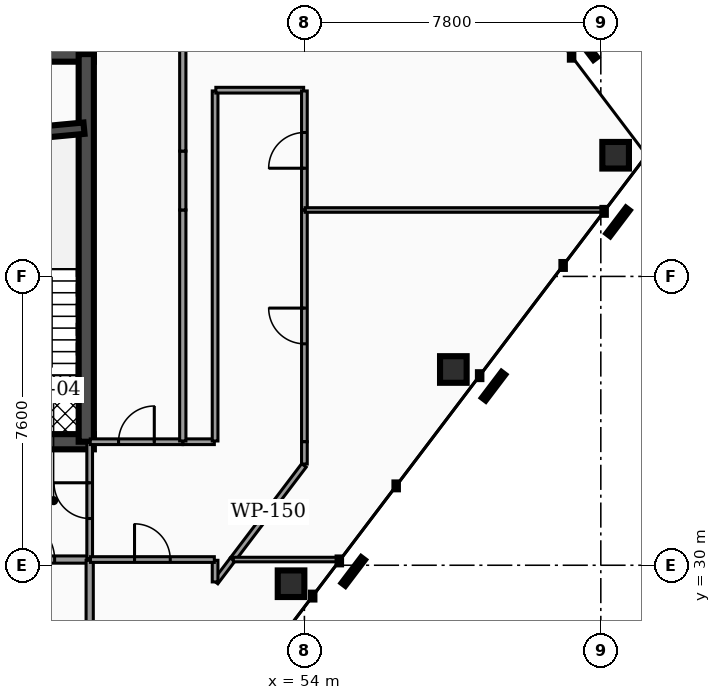
"""IFC4 building model, lengths in metres.
Left out: names, types, materials, properties, quantities, classifications, styles, units other than length and angle.
Written with IfcOpenShell. Run it as: python <this file> out.ifc"""

import sys

from ifc_helpers import new_model, si_unit, direction, frame, frame_2d, origin, origin_2d, place, context, subcontext, project, spatial, rectangle, hollow_rectangle, extrude, element, fill, save


model = new_model("IFC4")
c1 = context("Model", 3, precision=1e-05, world=origin(), true_north=direction((0.0, 1.0)))
c2 = subcontext(c1, "Body", "Model", "MODEL_VIEW")
j1 = project(units=[si_unit("LENGTHUNIT", "METRE"), si_unit("PLANEANGLEUNIT", "RADIAN")], contexts=[c1])
p1 = place(None, origin())
s1 = spatial("IfcSite", under=j1, at=p1, CompositionType="ELEMENT")
p2 = place(p1, origin())
s2 = spatial("IfcBuilding", under=s1, at=p2, CompositionType="ELEMENT")
p3 = place(p2, frame((0.0, 0.0, 187.0)))
s3 = spatial("IfcBuildingStorey", under=s2, at=p3, CompositionType="ELEMENT", Elevation=187.0)
p4 = place(p3, frame((28.4, 43.45, 0.0), z_axis=(0.0, 0.0, 1.0), x_axis=(1.0, 0.0, 0.0)))
e1 = element("IfcWall", 1, at=p4, inside=s3, PredefinedType="SHEAR", context=c2, shape_type="SweptSolid", body=[
    extrude(rectangle(XDim=20.06, YDim=0.4, at=frame_2d((10.03, 0.0))), origin(), (0.0, 0.0, 1.0), 3.5),
])
p5 = place(p3, frame((28.4, 33.25, 0.0), z_axis=(0.0, 0.0, 1.0), x_axis=(1.0, 0.0, 0.0)))
e2 = element("IfcWall", 2, at=p5, inside=s3, PredefinedType="SHEAR", context=c2, shape_type="SweptSolid", body=[
    extrude(rectangle(XDim=20.06, YDim=0.4, at=frame_2d((10.03, 0.0))), origin(), (0.0, 0.0, 1.0), 3.5),
])
p6 = place(p5, frame((4.03, 0.0, 0.0)))
e3 = element("IfcOpeningElement", 3, at=p6, cuts=e2, PredefinedType="OPENING", context=c2, shape_type="SweptSolid", body=[
    extrude(rectangle(XDim=1.1, YDim=2.15, at=frame_2d((0.55, 1.075))), frame((0.0, 0.21, 0.0), z_axis=(0.0, -1.0, 0.0), x_axis=(1.0, 0.0, 0.0)), (0.0, 0.0, 1.0), 0.42),
])
p7 = place(p5, frame((14.87, 0.0, 0.0)))
e4 = element("IfcOpeningElement", 4, at=p7, cuts=e2, PredefinedType="OPENING", context=c2, shape_type="SweptSolid", body=[
    extrude(rectangle(XDim=1.1, YDim=2.15, at=frame_2d((0.55, 1.075))), frame((0.0, 0.21, 0.0), z_axis=(0.0, -1.0, 0.0), x_axis=(1.0, 0.0, 0.0)), (0.0, 0.0, 1.0), 0.42),
])
p8 = place(p5, frame((5.95, 0.0, 0.0)))
e5 = element("IfcOpeningElement", 5, at=p8, cuts=e2, PredefinedType="OPENING", context=c2, shape_type="SweptSolid", body=[
    extrude(rectangle(XDim=1.0, YDim=2.1, at=frame_2d((0.5, 1.05))), frame((0.0, 0.21, 0.0), z_axis=(0.0, -1.0, 0.0), x_axis=(1.0, 0.0, 0.0)), (0.0, 0.0, 1.0), 0.42),
])
p9 = place(p5, frame((7.65, 0.0, 0.0)))
e6 = element("IfcOpeningElement", 6, at=p9, cuts=e2, PredefinedType="OPENING", context=c2, shape_type="SweptSolid", body=[
    extrude(rectangle(XDim=1.0, YDim=2.1, at=frame_2d((0.5, 1.05))), frame((0.0, 0.21, 0.0), z_axis=(0.0, -1.0, 0.0), x_axis=(1.0, 0.0, 0.0)), (0.0, 0.0, 1.0), 0.42),
])
p10 = place(p5, frame((1.31, 0.0, 0.0)))
e7 = element("IfcOpeningElement", 7, at=p10, cuts=e2, PredefinedType="OPENING", context=c2, shape_type="SweptSolid", body=[
    extrude(rectangle(XDim=1.1, YDim=2.2, at=frame_2d((0.55, 1.1))), frame((0.0, 0.21, 0.0), z_axis=(0.0, -1.0, 0.0), x_axis=(1.0, 0.0, 0.0)), (0.0, 0.0, 1.0), 0.42),
])
p11 = place(p5, frame((9.44, 0.0, 0.0)))
e8 = element("IfcOpeningElement", 8, at=p11, cuts=e2, PredefinedType="OPENING", context=c2, shape_type="SweptSolid", body=[
    extrude(rectangle(XDim=1.12, YDim=2.05, at=frame_2d((0.56, 1.025))), frame((0.0, 0.21, 0.0), z_axis=(0.0, -1.0, 0.0), x_axis=(1.0, 0.0, 0.0)), (0.0, 0.0, 1.0), 0.42),
])
p12 = place(p5, frame((17.65, 0.0, 0.0)))
e9 = element("IfcOpeningElement", 9, at=p12, cuts=e2, PredefinedType="OPENING", context=c2, shape_type="SweptSolid", body=[
    extrude(rectangle(XDim=1.1, YDim=2.2, at=frame_2d((0.55, 1.1))), frame((0.0, 0.21, 0.0), z_axis=(0.0, -1.0, 0.0), x_axis=(1.0, 0.0, 0.0)), (0.0, 0.0, 1.0), 0.42),
])
p13 = place(p3, frame((48.26, 33.25, 0.0), z_axis=(0.0, 0.0, 1.0), x_axis=(0.0, 1.0, 0.0)))
e10 = element("IfcWall", 10, at=p13, inside=s3, PredefinedType="SHEAR", context=c2, shape_type="SweptSolid", body=[
    extrude(rectangle(XDim=10.2, YDim=0.4, at=frame_2d((5.1, 0.0))), origin(), (0.0, 0.0, 1.0), 3.5),
])
p14 = place(p3, frame((44.98, 41.2, 0.0), z_axis=(0.0, 0.0, 1.0), x_axis=(0.995686468965, 0.09278176286, 0.0)))
e11 = element("IfcWall", 11, at=p14, inside=s3, PredefinedType="SHEAR", context=c2, shape_type="SweptSolid", body=[
    extrude(rectangle(XDim=3.234, YDim=0.3, at=frame_2d((1.617, 0.0))), origin(), (0.0, 0.0, 1.0), 3.5),
])
for number, where, z_axis, x_axis in (
    (12, (53.649, 29.514, 0.0), (0.0, 0.0, 1.0), (1.0, 0.0, 0.0)),
    (13, (57.919, 35.151, 0.0), (0.0, 0.0, 1.0), (1.0, 0.0, 0.0)),
    (14, (62.19, 40.788, 0.0), (0.0, 0.0, 1.0), (1.0, 0.0, 0.0)),
):
    element("IfcColumn", number, at=place(p3, frame(where, z_axis=z_axis, x_axis=x_axis)), inside=s3, PredefinedType="COLUMN", context=c2, shape_type="SweptSolid", body=[
        extrude(hollow_rectangle(XDim=0.7, YDim=0.7, WallThickness=0.035, at=origin_2d()), origin(), (0.0, 0.0, 1.0), 3.5),
    ])
p15 = place(p3, frame((45.405, 30.15, 0.0), z_axis=(0.0, 0.0, 1.0), x_axis=(1.0, 0.0, 0.0)))
e15 = element("IfcWall", 15, at=p15, inside=s3, PredefinedType="PARTITIONING", context=c2, shape_type="SweptSolid", body=[
    extrude(rectangle(XDim=2.925, YDim=0.19, at=frame_2d((1.462, 0.0))), origin(), (0.0, 0.0, 1.0), 2.457),
])
p16 = place(p15, frame((0.903, 0.0, 0.0)))
e16 = element("IfcOpeningElement", 16, at=p16, cuts=e15, PredefinedType="OPENING", context=c2, shape_type="SweptSolid", body=[
    extrude(rectangle(XDim=1.12, YDim=2.05, at=frame_2d((0.56, 1.025))), frame((0.0, 0.105, 0.0), z_axis=(0.0, -1.0, 0.0), x_axis=(1.0, 0.0, 0.0)), (0.0, 0.0, 1.0), 0.21),
])
p17 = place(p3, frame((48.35, 30.17, 0.0), z_axis=(0.0, 0.0, 1.0), x_axis=(0.0, 1.0, 0.0)))
e17 = element("IfcWall", 17, at=p17, inside=s3, PredefinedType="PARTITIONING", context=c2, shape_type="SweptSolid", body=[
    extrude(rectangle(XDim=3.06, YDim=0.15, at=frame_2d((1.53, 0.0))), origin(), (0.0, 0.0, 1.0), 2.457),
])
p18 = place(p17, frame((1.06, 0.0, 0.0)))
e18 = element("IfcOpeningElement", 18, at=p18, cuts=e17, PredefinedType="OPENING", context=c2, shape_type="SweptSolid", body=[
    extrude(rectangle(XDim=0.94, YDim=2.05, at=frame_2d((0.47, 1.025))), frame((0.0, 0.085, 0.0), z_axis=(0.0, -1.0, 0.0), x_axis=(1.0, 0.0, 0.0)), (0.0, 0.0, 1.0), 0.17),
])
p19 = place(p3, frame((48.35, 27.37, 0.0), z_axis=(0.0, 0.0, 1.0), x_axis=(0.0, 1.0, 0.0)))
e19 = element("IfcWall", 19, at=p19, inside=s3, PredefinedType="PARTITIONING", context=c2, shape_type="SweptSolid", body=[
    extrude(rectangle(XDim=2.76, YDim=0.19, at=frame_2d((1.38, 0.0))), origin(), (0.0, 0.0, 1.0), 2.457),
])
p20 = place(p3, frame((51.662, 29.557, 0.0), z_axis=(0.0, 0.0, 1.0), x_axis=(0.603572672845, 0.797307988543, 0.0)))
e20 = element("IfcWall", 20, at=p20, inside=s3, PredefinedType="PARTITIONING", context=c2, shape_type="SweptSolid", body=[
    extrude(rectangle(XDim=0.742, YDim=0.15, at=frame_2d((0.371, 0.0))), origin(), (0.0, 0.0, 1.0), 2.457),
])
p21 = place(p3, frame((51.65, 29.562, 0.0), z_axis=(0.0, 0.0, 1.0), x_axis=(0.0, 1.0, 0.0)))
e21 = element("IfcWall", 21, at=p21, inside=s3, PredefinedType="PARTITIONING", context=c2, shape_type="SweptSolid", body=[
    extrude(rectangle(XDim=0.568, YDim=0.15, at=frame_2d((0.284, 0.0))), origin(), (0.0, 0.0, 1.0), 2.457),
])
p22 = place(p3, frame((48.37, 30.15, 0.0), z_axis=(0.0, 0.0, 1.0), x_axis=(1.0, 0.0, 0.0)))
e22 = element("IfcWall", 22, at=p22, inside=s3, PredefinedType="PARTITIONING", context=c2, shape_type="SweptSolid", body=[
    extrude(rectangle(XDim=3.26, YDim=0.15, at=frame_2d((1.63, 0.0))), origin(), (0.0, 0.0, 1.0), 2.457),
])
p23 = place(p22, frame((1.16, 0.0, 0.0)))
e23 = element("IfcOpeningElement", 23, at=p23, cuts=e22, PredefinedType="OPENING", context=c2, shape_type="SweptSolid", body=[
    extrude(rectangle(XDim=0.94, YDim=2.05, at=frame_2d((0.47, 1.025))), frame((0.0, 0.085, 0.0), z_axis=(0.0, -1.0, 0.0), x_axis=(1.0, 0.0, 0.0)), (0.0, 0.0, 1.0), 0.17),
])
p24 = place(p3, frame((54.0, 33.25, 0.0), z_axis=(0.0, 0.0, 1.0), x_axis=(0.0, 1.0, 0.0)))
e24 = element("IfcWall", 24, at=p24, inside=s3, PredefinedType="PARTITIONING", context=c2, shape_type="SweptSolid", body=[
    extrude(rectangle(XDim=6.093, YDim=0.15, at=frame_2d((3.046, 0.0))), origin(), (0.0, 0.0, 1.0), 2.457),
])
p25 = place(p24, frame((2.576, 0.0, 0.0)))
e25 = element("IfcOpeningElement", 25, at=p25, cuts=e24, PredefinedType="OPENING", context=c2, shape_type="SweptSolid", body=[
    extrude(rectangle(XDim=0.94, YDim=2.05, at=frame_2d((0.47, 1.025))), frame((0.0, 0.085, 0.0), z_axis=(0.0, -1.0, 0.0), x_axis=(1.0, 0.0, 0.0)), (0.0, 0.0, 1.0), 0.17),
])
p26 = place(p3, frame((54.0, 32.664, 0.0), z_axis=(0.0, 0.0, 1.0), x_axis=(0.0, 1.0, 0.0)))
e26 = element("IfcWall", 26, at=p26, inside=s3, PredefinedType="PARTITIONING", context=c2, shape_type="SweptSolid", body=[
    extrude(rectangle(XDim=0.586, YDim=0.15, at=frame_2d((0.293, 0.0))), origin(), (0.0, 0.0, 1.0), 2.457),
])
p27 = place(p3, frame((52.114, 30.154, 0.0), z_axis=(0.0, 0.0, 1.0), x_axis=(0.603819819336, 0.797120835116, 0.0)))
e27 = element("IfcWall", 27, at=p27, inside=s3, PredefinedType="PARTITIONING", context=c2, shape_type="SweptSolid", body=[
    extrude(rectangle(XDim=3.103, YDim=0.15, at=frame_2d((1.552, 0.0))), origin(), (0.0, 0.0, 1.0), 2.457),
])
p28 = place(p3, frame((50.805, 33.25, 0.0), z_axis=(0.0, 0.0, 1.0), x_axis=(1.0, 0.0, 0.0)))
e28 = element("IfcWall", 28, at=p28, inside=s3, PredefinedType="PARTITIONING", context=c2, shape_type="SweptSolid", body=[
    extrude(rectangle(XDim=0.825, YDim=0.15, at=frame_2d((0.413, 0.0))), origin(), (0.0, 0.0, 1.0), 2.457),
])
p29 = place(p3, frame((51.65, 33.27, 0.0), z_axis=(0.0, 0.0, 1.0), x_axis=(0.0, 1.0, 0.0)))
e29 = element("IfcWall", 29, at=p29, inside=s3, PredefinedType="PARTITIONING", context=c2, shape_type="SweptSolid", body=[
    extrude(rectangle(XDim=9.21, YDim=0.15, at=frame_2d((4.605, 0.0))), origin(), (0.0, 0.0, 1.0), 2.457),
])
p30 = place(p3, frame((51.67, 42.5, 0.0), z_axis=(0.0, 0.0, 1.0), x_axis=(1.0, 0.0, 0.0)))
e30 = element("IfcWall", 30, at=p30, inside=s3, PredefinedType="PARTITIONING", context=c2, shape_type="SweptSolid", body=[
    extrude(rectangle(XDim=2.31, YDim=0.15, at=frame_2d((1.155, 0.0))), origin(), (0.0, 0.0, 1.0), 2.457),
])
p31 = place(p3, frame((54.0, 39.353, 0.0), z_axis=(0.0, 0.0, 1.0), x_axis=(0.0, 1.0, 0.0)))
e31 = element("IfcWall", 31, at=p31, inside=s3, PredefinedType="PARTITIONING", context=c2, shape_type="SweptSolid", body=[
    extrude(rectangle(XDim=3.127, YDim=0.15, at=frame_2d((1.563, 0.0))), origin(), (0.0, 0.0, 1.0), 2.457),
])
p32 = place(p31, frame((1.094, 0.0, 0.0)))
e32 = element("IfcOpeningElement", 32, at=p32, cuts=e31, PredefinedType="OPENING", context=c2, shape_type="SweptSolid", body=[
    extrude(rectangle(XDim=0.94, YDim=2.05, at=frame_2d((0.47, 1.025))), frame((0.0, 0.085, 0.0), z_axis=(0.0, -1.0, 0.0), x_axis=(1.0, 0.0, 0.0)), (0.0, 0.0, 1.0), 0.17),
])
p33 = place(p3, frame((48.365, 33.25, 0.0), z_axis=(0.0, 0.0, 1.0), x_axis=(1.0, 0.0, 0.0)))
e33 = element("IfcWall", 33, at=p33, inside=s3, PredefinedType="PARTITIONING", context=c2, shape_type="SweptSolid", body=[
    extrude(rectangle(XDim=2.43, YDim=0.15, at=frame_2d((1.215, 0.0))), origin(), (0.0, 0.0, 1.0), 2.457),
])
p34 = place(p33, frame((0.745, 0.0, 0.0)))
e34 = element("IfcOpeningElement", 34, at=p34, cuts=e33, PredefinedType="OPENING", context=c2, shape_type="SweptSolid", body=[
    extrude(rectangle(XDim=0.94, YDim=2.05, at=frame_2d((0.47, 1.025))), frame((0.0, 0.085, 0.0), z_axis=(0.0, -1.0, 0.0), x_axis=(1.0, 0.0, 0.0)), (0.0, 0.0, 1.0), 0.17),
])
p35 = place(p3, frame((52.131, 30.15, 0.0), z_axis=(0.0, 0.0, 1.0), x_axis=(1.0, 0.0, 0.0)))
e35 = element("IfcWall", 35, at=p35, inside=s3, PredefinedType="PARTITIONING", context=c2, shape_type="SweptSolid", body=[
    extrude(rectangle(XDim=2.8, YDim=0.12, at=frame_2d((1.4, 0.0))), origin(), (0.0, 0.0, 1.0), 2.457),
])
p36 = place(p3, frame((54.02, 39.348, 0.0), z_axis=(0.0, 0.0, 1.0), x_axis=(1.0, 0.0, 0.0)))
e36 = element("IfcWall", 36, at=p36, inside=s3, PredefinedType="PARTITIONING", context=c2, shape_type="SweptSolid", body=[
    extrude(rectangle(XDim=7.879, YDim=0.12, at=frame_2d((3.94, 0.0))), origin(), (0.0, 0.0, 1.0), 2.457),
])
p37 = place(p3, frame((50.8, 33.27, 0.0), z_axis=(0.0, 0.0, 1.0), x_axis=(0.0, 1.0, 0.0)))
e37 = element("IfcWall", 37, at=p37, inside=s3, PredefinedType="PARTITIONING", context=c2, shape_type="SweptSolid", body=[
    extrude(rectangle(XDim=6.078, YDim=0.165, at=frame_2d((3.039, 0.0))), origin(), (0.0, 0.0, 1.0), 2.457),
])
p38 = place(p3, frame((50.8, 39.348, 0.0), z_axis=(0.0, 0.0, 1.0), x_axis=(0.0, 1.0, 0.0)))
e38 = element("IfcWall", 38, at=p38, inside=s3, PredefinedType="PARTITIONING", context=c2, shape_type="SweptSolid", body=[
    extrude(rectangle(XDim=1.55, YDim=0.165, at=frame_2d((0.775, 0.0))), origin(), (0.0, 0.0, 1.0), 2.457),
])
p39 = place(p3, frame((50.8, 40.898, 0.0), z_axis=(0.0, 0.0, 1.0), x_axis=(0.0, 1.0, 0.0)))
e39 = element("IfcWall", 39, at=p39, inside=s3, PredefinedType="PARTITIONING", context=c2, shape_type="SweptSolid", body=[
    extrude(rectangle(XDim=5.478, YDim=0.165, at=frame_2d((2.739, 0.0))), origin(), (0.0, 0.0, 1.0), 2.457),
])
p40 = place(p16, origin())
e40 = element("IfcDoor", 40, at=p40, inside=s3, OperationType="SINGLE_SWING_LEFT", PredefinedType="DOOR", context=c2, shape_type="SweptSolid", body=[
    extrude(rectangle(XDim=1.12, YDim=2.05, at=frame_2d((0.56, 1.025))), frame((0.0, 0.025, 0.0), z_axis=(0.0, -1.0, 0.0), x_axis=(1.0, 0.0, 0.0)), (0.0, 0.0, 1.0), 0.05),
])
fill(e16, e40)
p41 = place(p18, origin())
e41 = element("IfcDoor", 41, at=p41, inside=s3, OperationType="SINGLE_SWING_RIGHT", PredefinedType="DOOR", context=c2, shape_type="SweptSolid", body=[
    extrude(rectangle(XDim=0.94, YDim=2.05, at=frame_2d((0.47, 1.025))), frame((0.0, 0.025, 0.0), z_axis=(0.0, -1.0, 0.0), x_axis=(1.0, 0.0, 0.0)), (0.0, 0.0, 1.0), 0.05),
])
fill(e18, e41)
p42 = place(p23, origin())
e42 = element("IfcDoor", 42, at=p42, inside=s3, OperationType="SINGLE_SWING_LEFT", PredefinedType="DOOR", context=c2, shape_type="SweptSolid", body=[
    extrude(rectangle(XDim=0.94, YDim=2.05, at=frame_2d((0.47, 1.025))), frame((0.0, 0.025, 0.0), z_axis=(0.0, -1.0, 0.0), x_axis=(1.0, 0.0, 0.0)), (0.0, 0.0, 1.0), 0.05),
])
fill(e23, e42)
p43 = place(p25, origin())
e43 = element("IfcDoor", 43, at=p43, inside=s3, OperationType="SINGLE_SWING_RIGHT", PredefinedType="DOOR", context=c2, shape_type="SweptSolid", body=[
    extrude(rectangle(XDim=0.94, YDim=2.05, at=frame_2d((0.47, 1.025))), frame((0.0, 0.025, 0.0), z_axis=(0.0, -1.0, 0.0), x_axis=(1.0, 0.0, 0.0)), (0.0, 0.0, 1.0), 0.05),
])
fill(e25, e43)
p44 = place(p32, origin())
e44 = element("IfcDoor", 44, at=p44, inside=s3, OperationType="SINGLE_SWING_LEFT", PredefinedType="DOOR", context=c2, shape_type="SweptSolid", body=[
    extrude(rectangle(XDim=0.94, YDim=2.05, at=frame_2d((0.47, 1.025))), frame((0.0, 0.025, 0.0), z_axis=(0.0, -1.0, 0.0), x_axis=(1.0, 0.0, 0.0)), (0.0, 0.0, 1.0), 0.05),
])
fill(e32, e44)
p45 = place(p34, origin())
e45 = element("IfcDoor", 45, at=p45, inside=s3, OperationType="SINGLE_SWING_RIGHT", PredefinedType="DOOR", context=c2, shape_type="SweptSolid", body=[
    extrude(rectangle(XDim=0.94, YDim=2.05, at=frame_2d((0.47, 1.025))), frame((0.0, 0.025, 0.0), z_axis=(0.0, -1.0, 0.0), x_axis=(1.0, 0.0, 0.0)), (0.0, 0.0, 1.0), 0.05),
])
fill(e34, e45)
save(model, sys.argv[1])
